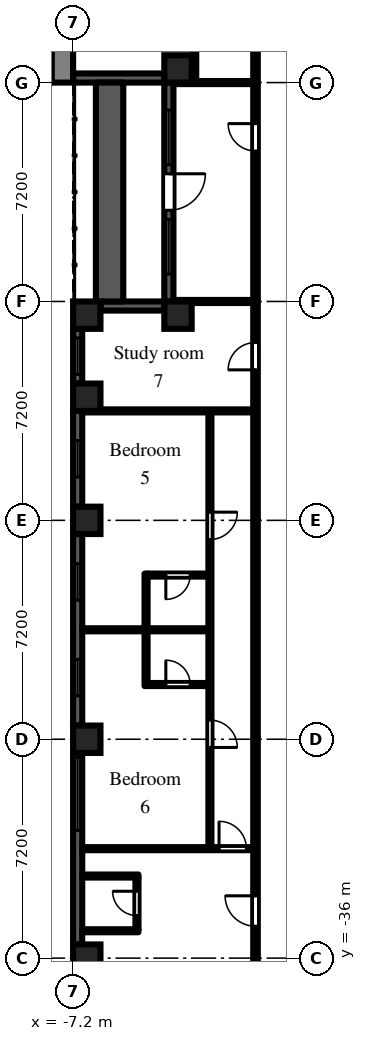
"""IFC4 building model, lengths in metres.
Left out: names, types, materials, properties, quantities, classifications, styles, units other than length and angle.
Written with IfcOpenShell. Run it as: python <this file> out.ifc"""

import sys

from ifc_helpers import new_model, si_unit, direction, frame, frame_2d, origin, origin_2d, place, context, subcontext, project, spatial, rectangle, extrude, element, fill, save


model = new_model("IFC4")
c1 = context("Model", 3, precision=1e-05, world=origin(), true_north=direction((0.0, 1.0)))
c2 = subcontext(c1, "Body", "Model", "MODEL_VIEW")
j1 = project(units=[si_unit("LENGTHUNIT", "METRE"), si_unit("PLANEANGLEUNIT", "RADIAN")], contexts=[c1])
p1 = place(None, origin())
s1 = spatial("IfcSite", under=j1, at=p1, CompositionType="ELEMENT")
p2 = place(p1, origin())
s2 = spatial("IfcBuilding", under=s1, at=p2, CompositionType="ELEMENT")
p3 = place(p2, frame((0.0, 0.0, 44.7)))
s3 = spatial("IfcBuildingStorey", under=s2, at=p3, CompositionType="ELEMENT", Elevation=44.7)
for number, where, z_axis, x_axis in (
    (1, (-6.75, -36.0, 0.0), (0.0, 0.0, 1.0), (1.0, 0.0, 0.0)),
    (2, (-6.75, -28.8, 0.0), (0.0, 0.0, 1.0), (1.0, 0.0, 0.0)),
    (3, (-6.75, -21.6, 0.0), (0.0, 0.0, 1.0), (1.0, 0.0, 0.0)),
    (4, (-6.75, -17.55, 0.0), (0.0, 0.0, 1.0), (1.0, 0.0, 0.0)),
    (5, (-6.75, -14.85, 0.0), (0.0, 0.0, 1.0), (1.0, 0.0, 0.0)),
    (6, (-3.75, -14.85, 0.0), (0.0, 0.0, 1.0), (1.0, 0.0, 0.0)),
    (7, (-3.75, -6.75, 0.0), (0.0, 0.0, 1.0), (1.0, 0.0, 0.0)),
):
    element("IfcColumn", number, at=place(p3, frame(where, z_axis=z_axis, x_axis=x_axis)), inside=s3, PredefinedType="COLUMN", context=c2, shape_type="SweptSolid", body=[
        extrude(rectangle(XDim=0.9, YDim=0.9, at=origin_2d()), origin(), (0.0, 0.0, 1.0), 3.0),
    ])
p4 = place(p3, frame((-7.2, -7.05, 0.0), z_axis=(0.0, 0.0, 1.0), x_axis=(1.0, 0.0, 0.0)))
e8 = element("IfcWall", 8, at=p4, inside=s3, PredefinedType="SOLIDWALL", context=c2, shape_type="SweptSolid", body=[
    extrude(rectangle(XDim=3.0, YDim=0.3, at=frame_2d((1.5, 0.0))), origin(), (0.0, 0.0, 1.0), 2.1),
])
p5 = place(p3, frame((-4.05, -7.2, 0.0), z_axis=(0.0, 0.0, 1.0), x_axis=(0.0, -1.0, 0.0)))
e9 = element("IfcWall", 9, at=p5, inside=s3, PredefinedType="SOLIDWALL", context=c2, shape_type="SweptSolid", body=[
    extrude(rectangle(XDim=7.2, YDim=0.3, at=frame_2d((3.6, 0.0))), origin(), (0.0, 0.0, 1.0), 2.1),
])
p6 = place(p5, frame((3.0, 0.0, 0.0)))
e10 = element("IfcOpeningElement", 10, at=p6, cuts=e9, PredefinedType="OPENING", context=c2, shape_type="SweptSolid", body=[
    extrude(rectangle(XDim=1.2, YDim=2.05, at=frame_2d((0.6, 1.025))), frame((0.0, 0.16, 0.0), z_axis=(0.0, -1.0, 0.0), x_axis=(1.0, 0.0, 0.0)), (0.0, 0.0, 1.0), 0.32),
])
p7 = place(p5, frame((0.9, 0.0, 0.2)))
e11 = element("IfcOpeningElement", 11, at=p7, cuts=e9, PredefinedType="OPENING", context=c2, shape_type="SweptSolid", body=[
    extrude(rectangle(XDim=1.8, YDim=1.85, at=frame_2d((0.9, 0.925))), frame((0.0, 0.16, 0.0), z_axis=(0.0, -1.0, 0.0), x_axis=(1.0, 0.0, 0.0)), (0.0, 0.0, 1.0), 0.32),
])
p8 = place(p5, frame((4.5, 0.0, 0.2)))
e12 = element("IfcOpeningElement", 12, at=p8, cuts=e9, PredefinedType="OPENING", context=c2, shape_type="SweptSolid", body=[
    extrude(rectangle(XDim=1.8, YDim=1.85, at=frame_2d((0.9, 0.925))), frame((0.0, 0.16, 0.0), z_axis=(0.0, -1.0, 0.0), x_axis=(1.0, 0.0, 0.0)), (0.0, 0.0, 1.0), 0.32),
])
p9 = place(p3, frame((-4.2, -14.55, 0.0), z_axis=(0.0, 0.0, 1.0), x_axis=(-1.0, 0.0, 0.0)))
e13 = element("IfcWall", 13, at=p9, inside=s3, PredefinedType="SOLIDWALL", context=c2, shape_type="SweptSolid", body=[
    extrude(rectangle(XDim=2.1, YDim=0.3, at=frame_2d((1.05, 0.0))), origin(), (0.0, 0.0, 1.0), 2.1),
])
p10 = place(p3, frame((-7.05, -15.3, 0.0), z_axis=(0.0, 0.0, 1.0), x_axis=(0.0, -1.0, 0.0)))
e14 = element("IfcWall", 14, at=p10, inside=s3, PredefinedType="SOLIDWALL", context=c2, shape_type="SweptSolid", body=[
    extrude(rectangle(XDim=1.8, YDim=0.3, at=frame_2d((0.9, 0.0))), origin(), (0.0, 0.0, 1.0), 2.1),
])
p11 = place(p10, frame((0.3, 0.0, 0.2)))
e15 = element("IfcOpeningElement", 15, at=p11, cuts=e14, PredefinedType="OPENING", context=c2, shape_type="SweptSolid", body=[
    extrude(rectangle(XDim=1.2, YDim=1.85, at=frame_2d((0.6, 0.925))), frame((0.0, 0.16, 0.0), z_axis=(0.0, -1.0, 0.0), x_axis=(1.0, 0.0, 0.0)), (0.0, 0.0, 1.0), 0.32),
])
p12 = place(p3, frame((-7.05, -18.0, 0.0), z_axis=(0.0, 0.0, 1.0), x_axis=(0.0, -1.0, 0.0)))
e16 = element("IfcWall", 16, at=p12, inside=s3, PredefinedType="SOLIDWALL", context=c2, shape_type="SweptSolid", body=[
    extrude(rectangle(XDim=3.15, YDim=0.3, at=frame_2d((1.575, 0.0))), origin(), (0.0, 0.0, 1.0), 2.1),
])
p13 = place(p12, frame((0.975, 0.0, 0.2)))
e17 = element("IfcOpeningElement", 17, at=p13, cuts=e16, PredefinedType="OPENING", context=c2, shape_type="SweptSolid", body=[
    extrude(rectangle(XDim=1.2, YDim=1.85, at=frame_2d((0.6, 0.925))), frame((0.0, 0.16, 0.0), z_axis=(0.0, -1.0, 0.0), x_axis=(1.0, 0.0, 0.0)), (0.0, 0.0, 1.0), 0.32),
])
p14 = place(p3, frame((-7.05, -22.05, 0.0), z_axis=(0.0, 0.0, 1.0), x_axis=(0.0, -1.0, 0.0)))
e18 = element("IfcWall", 18, at=p14, inside=s3, PredefinedType="SOLIDWALL", context=c2, shape_type="SweptSolid", body=[
    extrude(rectangle(XDim=6.3, YDim=0.3, at=frame_2d((3.15, 0.0))), origin(), (0.0, 0.0, 1.0), 2.1),
])
p15 = place(p14, frame((0.975, 0.0, 0.2)))
e19 = element("IfcOpeningElement", 19, at=p15, cuts=e18, PredefinedType="OPENING", context=c2, shape_type="SweptSolid", body=[
    extrude(rectangle(XDim=1.2, YDim=1.85, at=frame_2d((0.6, 0.925))), frame((0.0, 0.16, 0.0), z_axis=(0.0, -1.0, 0.0), x_axis=(1.0, 0.0, 0.0)), (0.0, 0.0, 1.0), 0.32),
])
p16 = place(p14, frame((4.125, 0.0, 0.2)))
e20 = element("IfcOpeningElement", 20, at=p16, cuts=e18, PredefinedType="OPENING", context=c2, shape_type="SweptSolid", body=[
    extrude(rectangle(XDim=1.2, YDim=1.85, at=frame_2d((0.6, 0.925))), frame((0.0, 0.16, 0.0), z_axis=(0.0, -1.0, 0.0), x_axis=(1.0, 0.0, 0.0)), (0.0, 0.0, 1.0), 0.32),
])
p17 = place(p3, frame((-7.05, -29.25, 0.0), z_axis=(0.0, 0.0, 1.0), x_axis=(0.0, -1.0, 0.0)))
e21 = element("IfcWall", 21, at=p17, inside=s3, PredefinedType="SOLIDWALL", context=c2, shape_type="SweptSolid", body=[
    extrude(rectangle(XDim=6.3, YDim=0.3, at=frame_2d((3.15, 0.0))), origin(), (0.0, 0.0, 1.0), 2.1),
])
p18 = place(p17, frame((0.15, 0.0, 0.2)))
e22 = element("IfcOpeningElement", 22, at=p18, cuts=e21, PredefinedType="OPENING", context=c2, shape_type="SweptSolid", body=[
    extrude(rectangle(XDim=2.4, YDim=1.85, at=frame_2d((1.2, 0.925))), frame((0.0, 0.16, 0.0), z_axis=(0.0, -1.0, 0.0), x_axis=(1.0, 0.0, 0.0)), (0.0, 0.0, 1.0), 0.32),
])
p19 = place(p3, frame((-6.0, -14.4, 0.0), z_axis=(0.0, 0.0, 1.0), x_axis=(0.0, 1.0, 0.0)))
e23 = element("IfcWall", 23, at=p19, inside=s3, PredefinedType="PARAPET", context=c2, shape_type="SweptSolid", body=[
    extrude(rectangle(XDim=7.2, YDim=0.9, at=frame_2d((3.6, 0.0))), origin(), (0.0, 0.0, 1.0), 0.8),
])
p20 = place(p3, frame((-7.55, -7.2, 0.0), z_axis=(0.0, 0.0, 1.0), x_axis=(0.0, 1.0, 0.0)))
e24 = element("IfcWall", 24, at=p20, inside=s3, PredefinedType="SHEAR", context=c2, shape_type="SweptSolid", body=[
    extrude(rectangle(XDim=14.4, YDim=0.7, at=frame_2d((7.2, 0.0))), origin(), (0.0, 0.0, 1.0), 2.575),
])
p21 = place(p20, frame((6.0, 0.0, 0.0)))
e25 = element("IfcOpeningElement", 25, at=p21, cuts=e24, PredefinedType="OPENING", context=c2, shape_type="SweptSolid", body=[
    extrude(rectangle(XDim=2.4, YDim=2.2, at=frame_2d((1.2, 1.1))), frame((0.0, 0.36, 0.0), z_axis=(0.0, -1.0, 0.0), x_axis=(1.0, 0.0, 0.0)), (0.0, 0.0, 1.0), 0.72),
])
for number, where, z_axis, x_axis in (
    (26, (-6.9, -35.1, 0.0), (0.0, 0.0, 1.0), (1.0, 0.0, 0.0)),
    (27, (-6.9, -33.3, 0.0), (0.0, 0.0, 1.0), (1.0, 0.0, 0.0)),
):
    element("IfcWall", number, at=place(p3, frame(where, z_axis=z_axis, x_axis=x_axis)), inside=s3, PredefinedType="PARTITIONING", context=c2, shape_type="SweptSolid", body=[
        extrude(rectangle(XDim=1.85, YDim=0.1, at=frame_2d((0.925, 0.0))), origin(), (0.0, 0.0, 1.0), 2.575),
    ])
p22 = place(p3, frame((-6.9, -32.4, 0.0), z_axis=(0.0, 0.0, 1.0), x_axis=(1.0, 0.0, 0.0)))
e28 = element("IfcWall", 28, at=p22, inside=s3, PredefinedType="PARTITIONING", context=c2, shape_type="SweptSolid", body=[
    extrude(rectangle(XDim=5.625, YDim=0.1, at=frame_2d((2.812, 0.0))), origin(), (0.0, 0.0, 1.0), 2.575),
])
p23 = place(p22, frame((4.5, 0.0, 0.0)))
e29 = element("IfcOpeningElement", 29, at=p23, cuts=e28, PredefinedType="OPENING", context=c2, shape_type="SweptSolid", body=[
    extrude(rectangle(XDim=0.9, YDim=2.1, at=frame_2d((0.45, 1.05))), frame((0.0, 0.06, 0.0), z_axis=(0.0, -1.0, 0.0), x_axis=(1.0, 0.0, 0.0)), (0.0, 0.0, 1.0), 0.12),
])
p24 = place(p3, frame((-6.9, -25.2, 0.0), z_axis=(0.0, 0.0, 1.0), x_axis=(1.0, 0.0, 0.0)))
e30 = element("IfcWall", 30, at=p24, inside=s3, PredefinedType="PARTITIONING", context=c2, shape_type="SweptSolid", body=[
    extrude(rectangle(XDim=4.15, YDim=0.1, at=frame_2d((2.075, 0.0))), origin(), (0.0, 0.0, 1.0), 2.575),
])
p25 = place(p3, frame((-6.9, -18.0, 0.0), z_axis=(0.0, 0.0, 1.0), x_axis=(1.0, 0.0, 0.0)))
e31 = element("IfcWall", 31, at=p25, inside=s3, PredefinedType="PARTITIONING", context=c2, shape_type="SweptSolid", body=[
    extrude(rectangle(XDim=5.625, YDim=0.1, at=frame_2d((2.812, 0.0))), origin(), (0.0, 0.0, 1.0), 2.575),
])
p26 = place(p3, frame((-5.1, -35.05, 0.0), z_axis=(0.0, 0.0, 1.0), x_axis=(0.0, 1.0, 0.0)))
e32 = element("IfcWall", 32, at=p26, inside=s3, PredefinedType="PARTITIONING", context=c2, shape_type="SweptSolid", body=[
    extrude(rectangle(XDim=1.7, YDim=0.1, at=frame_2d((0.85, 0.0))), origin(), (0.0, 0.0, 1.0), 2.575),
])
p27 = place(p26, frame((0.45, 0.0, 0.0)))
e33 = element("IfcOpeningElement", 33, at=p27, cuts=e32, PredefinedType="OPENING", context=c2, shape_type="SweptSolid", body=[
    extrude(rectangle(XDim=0.8, YDim=2.1, at=frame_2d((0.4, 1.05))), frame((0.0, 0.06, 0.0), z_axis=(0.0, -1.0, 0.0), x_axis=(1.0, 0.0, 0.0)), (0.0, 0.0, 1.0), 0.12),
])
p28 = place(p3, frame((-4.8, -27.05, 0.0), z_axis=(0.0, 0.0, 1.0), x_axis=(0.0, 1.0, 0.0)))
e34 = element("IfcWall", 34, at=p28, inside=s3, PredefinedType="PARTITIONING", context=c2, shape_type="SweptSolid", body=[
    extrude(rectangle(XDim=3.7, YDim=0.1, at=frame_2d((1.85, 0.0))), origin(), (0.0, 0.0, 1.0), 2.575),
])
p29 = place(p3, frame((-4.75, -27.0, 0.0), z_axis=(0.0, 0.0, 1.0), x_axis=(1.0, 0.0, 0.0)))
e35 = element("IfcWall", 35, at=p29, inside=s3, PredefinedType="PARTITIONING", context=c2, shape_type="SweptSolid", body=[
    extrude(rectangle(XDim=2.0, YDim=0.1, at=frame_2d((1.0, 0.0))), origin(), (0.0, 0.0, 1.0), 2.575),
])
p30 = place(p29, frame((0.6, 0.0, 0.0)))
e36 = element("IfcOpeningElement", 36, at=p30, cuts=e35, PredefinedType="OPENING", context=c2, shape_type="SweptSolid", body=[
    extrude(rectangle(XDim=0.8, YDim=2.1, at=frame_2d((0.4, 1.05))), frame((0.0, 0.06, 0.0), z_axis=(0.0, -1.0, 0.0), x_axis=(1.0, 0.0, 0.0)), (0.0, 0.0, 1.0), 0.12),
])
p31 = place(p3, frame((-4.75, -23.4, 0.0), z_axis=(0.0, 0.0, 1.0), x_axis=(1.0, 0.0, 0.0)))
e37 = element("IfcWall", 37, at=p31, inside=s3, PredefinedType="PARTITIONING", context=c2, shape_type="SweptSolid", body=[
    extrude(rectangle(XDim=2.0, YDim=0.1, at=frame_2d((1.0, 0.0))), origin(), (0.0, 0.0, 1.0), 2.575),
])
p32 = place(p31, frame((0.6, 0.0, 0.0)))
e38 = element("IfcOpeningElement", 38, at=p32, cuts=e37, PredefinedType="OPENING", context=c2, shape_type="SweptSolid", body=[
    extrude(rectangle(XDim=0.8, YDim=2.1, at=frame_2d((0.4, 1.05))), frame((0.0, 0.06, 0.0), z_axis=(0.0, -1.0, 0.0), x_axis=(1.0, 0.0, 0.0)), (0.0, 0.0, 1.0), 0.12),
])
for number, where, z_axis, x_axis in (
    (39, (-3.9, -14.4, 0.0), (0.0, 0.0, 1.0), (1.0, 0.0, 0.0)),
    (40, (-3.9, -7.2, 0.0), (0.0, 0.0, 1.0), (1.0, 0.0, 0.0)),
):
    element("IfcWall", number, at=place(p3, frame(where, z_axis=z_axis, x_axis=x_axis)), inside=s3, PredefinedType="PARTITIONING", context=c2, shape_type="SweptSolid", body=[
        extrude(rectangle(XDim=2.625, YDim=0.1, at=frame_2d((1.312, 0.0))), origin(), (0.0, 0.0, 1.0), 2.575),
    ])
p33 = place(p3, frame((-3.2, -7.15, 0.0), z_axis=(0.0, 0.0, 1.0), x_axis=(0.0, 1.0, 0.0)))
e41 = element("IfcWall", 41, at=p33, inside=s3, PredefinedType="PARTITIONING", context=c2, shape_type="SweptSolid", body=[
    extrude(rectangle(XDim=5.875, YDim=0.1, at=frame_2d((2.938, 0.0))), origin(), (0.0, 0.0, 1.0), 2.575),
])
p34 = place(p3, frame((-2.7, -32.35, 0.0), z_axis=(0.0, 0.0, 1.0), x_axis=(0.0, 1.0, 0.0)))
e42 = element("IfcWall", 42, at=p34, inside=s3, PredefinedType="PARTITIONING", context=c2, shape_type="SweptSolid", body=[
    extrude(rectangle(XDim=14.3, YDim=0.1, at=frame_2d((7.15, 0.0))), origin(), (0.0, 0.0, 1.0), 2.575),
])
p35 = place(p34, frame((3.28, 0.0, 0.0)))
e43 = element("IfcOpeningElement", 43, at=p35, cuts=e42, PredefinedType="OPENING", context=c2, shape_type="SweptSolid", body=[
    extrude(rectangle(XDim=0.9, YDim=2.1, at=frame_2d((0.45, 1.05))), frame((0.0, 0.06, 0.0), z_axis=(0.0, -1.0, 0.0), x_axis=(1.0, 0.0, 0.0)), (0.0, 0.0, 1.0), 0.12),
])
p36 = place(p34, frame((10.12, 0.0, 0.0)))
e44 = element("IfcOpeningElement", 44, at=p36, cuts=e42, PredefinedType="OPENING", context=c2, shape_type="SweptSolid", body=[
    extrude(rectangle(XDim=0.9, YDim=2.1, at=frame_2d((0.45, 1.05))), frame((0.0, 0.06, 0.0), z_axis=(0.0, -1.0, 0.0), x_axis=(1.0, 0.0, 0.0)), (0.0, 0.0, 1.0), 0.12),
])
p37 = place(p3, frame((-1.2, -36.5, 0.0), z_axis=(0.0, 0.0, 1.0), x_axis=(0.0, 1.0, 0.0)))
e45 = element("IfcWall", 45, at=p37, inside=s3, PredefinedType="PARTITIONING", context=c2, shape_type="SweptSolid", body=[
    extrude(rectangle(XDim=35.225, YDim=0.15, at=frame_2d((17.613, 0.0))), origin(), (0.0, 0.0, 1.0), 2.575),
])
p38 = place(p37, frame((31.85, 0.0, 0.0)))
e46 = element("IfcOpeningElement", 46, at=p38, cuts=e45, PredefinedType="OPENING", context=c2, shape_type="SweptSolid", body=[
    extrude(rectangle(XDim=0.9, YDim=2.1, at=frame_2d((0.45, 1.05))), frame((0.0, 0.085, 0.0), z_axis=(0.0, -1.0, 0.0), x_axis=(1.0, 0.0, 0.0)), (0.0, 0.0, 1.0), 0.17),
])
p39 = place(p37, frame((27.05, 0.0, 0.0)))
e47 = element("IfcOpeningElement", 47, at=p39, cuts=e45, PredefinedType="OPENING", context=c2, shape_type="SweptSolid", body=[
    extrude(rectangle(XDim=0.9, YDim=2.1, at=frame_2d((0.45, 1.05))), frame((0.0, 0.085, 0.0), z_axis=(0.0, -1.0, 0.0), x_axis=(1.0, 0.0, 0.0)), (0.0, 0.0, 1.0), 0.17),
])
p40 = place(p37, frame((19.85, 0.0, 0.0)))
e48 = element("IfcOpeningElement", 48, at=p40, cuts=e45, PredefinedType="OPENING", context=c2, shape_type="SweptSolid", body=[
    extrude(rectangle(XDim=0.9, YDim=2.1, at=frame_2d((0.45, 1.05))), frame((0.0, 0.085, 0.0), z_axis=(0.0, -1.0, 0.0), x_axis=(1.0, 0.0, 0.0)), (0.0, 0.0, 1.0), 0.17),
])
p41 = place(p37, frame((1.55, 0.0, 0.0)))
e49 = element("IfcOpeningElement", 49, at=p41, cuts=e45, PredefinedType="OPENING", context=c2, shape_type="SweptSolid", body=[
    extrude(rectangle(XDim=1.0, YDim=2.1, at=frame_2d((0.5, 1.05))), frame((0.0, 0.085, 0.0), z_axis=(0.0, -1.0, 0.0), x_axis=(1.0, 0.0, 0.0)), (0.0, 0.0, 1.0), 0.17),
])
p42 = place(p6, origin())
e50 = element("IfcDoor", 50, at=p42, inside=s3, OperationType="SINGLE_SWING_LEFT", PredefinedType="DOOR", context=c2, shape_type="SweptSolid", body=[
    extrude(rectangle(XDim=1.2, YDim=2.05, at=frame_2d((0.6, 1.025))), frame((0.0, 0.025, 0.0), z_axis=(0.0, -1.0, 0.0), x_axis=(1.0, 0.0, 0.0)), (0.0, 0.0, 1.0), 0.05),
])
fill(e10, e50)
p43 = place(p7, origin())
e51 = element("IfcWindow", 51, at=p43, inside=s3, PartitioningType="SINGLE_PANEL", PredefinedType="WINDOW", context=c2, shape_type="SweptSolid", body=[
    extrude(rectangle(XDim=1.8, YDim=1.85, at=frame_2d((0.9, 0.925))), frame((0.0, 0.03, 0.0), z_axis=(0.0, -1.0, 0.0), x_axis=(1.0, 0.0, 0.0)), (0.0, 0.0, 1.0), 0.06),
])
fill(e11, e51)
p44 = place(p8, origin())
e52 = element("IfcWindow", 52, at=p44, inside=s3, PartitioningType="SINGLE_PANEL", PredefinedType="WINDOW", context=c2, shape_type="SweptSolid", body=[
    extrude(rectangle(XDim=1.8, YDim=1.85, at=frame_2d((0.9, 0.925))), frame((0.0, 0.03, 0.0), z_axis=(0.0, -1.0, 0.0), x_axis=(1.0, 0.0, 0.0)), (0.0, 0.0, 1.0), 0.06),
])
fill(e12, e52)
p45 = place(p11, origin())
e53 = element("IfcWindow", 53, at=p45, inside=s3, PartitioningType="SINGLE_PANEL", PredefinedType="WINDOW", context=c2, shape_type="SweptSolid", body=[
    extrude(rectangle(XDim=1.2, YDim=1.85, at=frame_2d((0.6, 0.925))), frame((0.0, 0.03, 0.0), z_axis=(0.0, -1.0, 0.0), x_axis=(1.0, 0.0, 0.0)), (0.0, 0.0, 1.0), 0.06),
])
fill(e15, e53)
p46 = place(p13, origin())
e54 = element("IfcWindow", 54, at=p46, inside=s3, PartitioningType="SINGLE_PANEL", PredefinedType="WINDOW", context=c2, shape_type="SweptSolid", body=[
    extrude(rectangle(XDim=1.2, YDim=1.85, at=frame_2d((0.6, 0.925))), frame((0.0, 0.03, 0.0), z_axis=(0.0, -1.0, 0.0), x_axis=(1.0, 0.0, 0.0)), (0.0, 0.0, 1.0), 0.06),
])
fill(e17, e54)
p47 = place(p15, origin())
e55 = element("IfcWindow", 55, at=p47, inside=s3, PartitioningType="SINGLE_PANEL", PredefinedType="WINDOW", context=c2, shape_type="SweptSolid", body=[
    extrude(rectangle(XDim=1.2, YDim=1.85, at=frame_2d((0.6, 0.925))), frame((0.0, 0.03, 0.0), z_axis=(0.0, -1.0, 0.0), x_axis=(1.0, 0.0, 0.0)), (0.0, 0.0, 1.0), 0.06),
])
fill(e19, e55)
p48 = place(p16, origin())
e56 = element("IfcWindow", 56, at=p48, inside=s3, PartitioningType="SINGLE_PANEL", PredefinedType="WINDOW", context=c2, shape_type="SweptSolid", body=[
    extrude(rectangle(XDim=1.2, YDim=1.85, at=frame_2d((0.6, 0.925))), frame((0.0, 0.03, 0.0), z_axis=(0.0, -1.0, 0.0), x_axis=(1.0, 0.0, 0.0)), (0.0, 0.0, 1.0), 0.06),
])
fill(e20, e56)
p49 = place(p18, origin())
e57 = element("IfcWindow", 57, at=p49, inside=s3, PartitioningType="SINGLE_PANEL", PredefinedType="WINDOW", context=c2, shape_type="SweptSolid", body=[
    extrude(rectangle(XDim=2.4, YDim=1.85, at=frame_2d((1.2, 0.925))), frame((0.0, 0.03, 0.0), z_axis=(0.0, -1.0, 0.0), x_axis=(1.0, 0.0, 0.0)), (0.0, 0.0, 1.0), 0.06),
])
fill(e22, e57)
p50 = place(p39, origin())
e58 = element("IfcDoor", 58, at=p50, inside=s3, OperationType="SINGLE_SWING_RIGHT", PredefinedType="DOOR", context=c2, shape_type="SweptSolid", body=[
    extrude(rectangle(XDim=0.9, YDim=2.1, at=frame_2d((0.45, 1.05))), frame((0.0, 0.025, 0.0), z_axis=(0.0, -1.0, 0.0), x_axis=(1.0, 0.0, 0.0)), (0.0, 0.0, 1.0), 0.05),
])
fill(e47, e58)
p51 = place(p40, origin())
e59 = element("IfcDoor", 59, at=p51, inside=s3, OperationType="SINGLE_SWING_LEFT", PredefinedType="DOOR", context=c2, shape_type="SweptSolid", body=[
    extrude(rectangle(XDim=0.9, YDim=2.1, at=frame_2d((0.45, 1.05))), frame((0.0, 0.025, 0.0), z_axis=(0.0, -1.0, 0.0), x_axis=(1.0, 0.0, 0.0)), (0.0, 0.0, 1.0), 0.05),
])
fill(e48, e59)
p52 = place(p27, origin())
e60 = element("IfcDoor", 60, at=p52, inside=s3, OperationType="SINGLE_SWING_RIGHT", PredefinedType="DOOR", context=c2, shape_type="SweptSolid", body=[
    extrude(rectangle(XDim=0.8, YDim=2.1, at=frame_2d((0.4, 1.05))), frame((0.0, 0.025, 0.0), z_axis=(0.0, -1.0, 0.0), x_axis=(1.0, 0.0, 0.0)), (0.0, 0.0, 1.0), 0.05),
])
fill(e33, e60)
p53 = place(p41, origin())
e61 = element("IfcDoor", 61, at=p53, inside=s3, OperationType="SINGLE_SWING_RIGHT", PredefinedType="DOOR", context=c2, shape_type="SweptSolid", body=[
    extrude(rectangle(XDim=1.0, YDim=2.1, at=frame_2d((0.5, 1.05))), frame((0.0, 0.025, 0.0), z_axis=(0.0, -1.0, 0.0), x_axis=(1.0, 0.0, 0.0)), (0.0, 0.0, 1.0), 0.05),
])
fill(e49, e61)
p54 = place(p35, frame((0.9, 0.0, 0.0), z_axis=(0.0, 0.0, 1.0), x_axis=(-1.0, 0.0, 0.0)))
e62 = element("IfcDoor", 62, at=p54, inside=s3, OperationType="SINGLE_SWING_RIGHT", PredefinedType="DOOR", context=c2, shape_type="SweptSolid", body=[
    extrude(rectangle(XDim=0.9, YDim=2.1, at=frame_2d((0.45, 1.05))), frame((0.0, 0.025, 0.0), z_axis=(0.0, -1.0, 0.0), x_axis=(1.0, 0.0, 0.0)), (0.0, 0.0, 1.0), 0.05),
])
fill(e43, e62)
p55 = place(p36, frame((0.9, 0.0, 0.0), z_axis=(0.0, 0.0, 1.0), x_axis=(-1.0, 0.0, 0.0)))
e63 = element("IfcDoor", 63, at=p55, inside=s3, OperationType="SINGLE_SWING_LEFT", PredefinedType="DOOR", context=c2, shape_type="SweptSolid", body=[
    extrude(rectangle(XDim=0.9, YDim=2.1, at=frame_2d((0.45, 1.05))), frame((0.0, 0.025, 0.0), z_axis=(0.0, -1.0, 0.0), x_axis=(1.0, 0.0, 0.0)), (0.0, 0.0, 1.0), 0.05),
])
fill(e44, e63)
p56 = place(p23, origin())
e64 = element("IfcDoor", 64, at=p56, inside=s3, OperationType="SINGLE_SWING_LEFT", PredefinedType="DOOR", context=c2, shape_type="SweptSolid", body=[
    extrude(rectangle(XDim=0.9, YDim=2.1, at=frame_2d((0.45, 1.05))), frame((0.0, 0.025, 0.0), z_axis=(0.0, -1.0, 0.0), x_axis=(1.0, 0.0, 0.0)), (0.0, 0.0, 1.0), 0.05),
])
fill(e29, e64)
p57 = place(p32, frame((0.8, 0.0, 0.0), z_axis=(0.0, 0.0, 1.0), x_axis=(-1.0, 0.0, 0.0)))
e65 = element("IfcDoor", 65, at=p57, inside=s3, OperationType="SINGLE_SWING_RIGHT", PredefinedType="DOOR", context=c2, shape_type="SweptSolid", body=[
    extrude(rectangle(XDim=0.8, YDim=2.1, at=frame_2d((0.4, 1.05))), frame((0.0, 0.025, 0.0), z_axis=(0.0, -1.0, 0.0), x_axis=(1.0, 0.0, 0.0)), (0.0, 0.0, 1.0), 0.05),
])
fill(e38, e65)
p58 = place(p30, origin())
e66 = element("IfcDoor", 66, at=p58, inside=s3, OperationType="SINGLE_SWING_LEFT", PredefinedType="DOOR", context=c2, shape_type="SweptSolid", body=[
    extrude(rectangle(XDim=0.8, YDim=2.1, at=frame_2d((0.4, 1.05))), frame((0.0, 0.025, 0.0), z_axis=(0.0, -1.0, 0.0), x_axis=(1.0, 0.0, 0.0)), (0.0, 0.0, 1.0), 0.05),
])
fill(e36, e66)
save(model, sys.argv[1])
